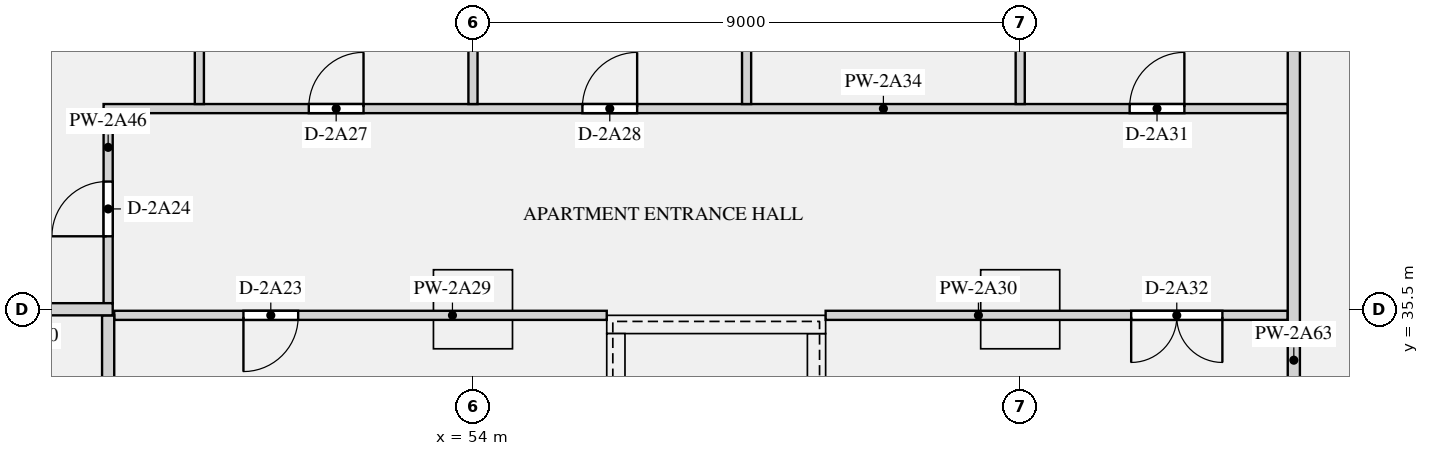
"""IFC4 building model, lengths in metres.
Left out: names, types, materials, properties, quantities, classifications, styles, units other than length and angle.
Written with IfcOpenShell. Run it as: python <this file> out.ifc"""

import sys

from ifc_helpers import new_model, si_unit, direction, frame, frame_2d, origin, origin_2d, place, context, subcontext, project, spatial, rectangle, extrude, element, fill, save


model = new_model("IFC4")
c1 = context("Model", 3, precision=1e-05, world=origin(), true_north=direction((0.0, 1.0)))
c2 = subcontext(c1, "Body", "Model", "MODEL_VIEW")
j1 = project(units=[si_unit("LENGTHUNIT", "METRE"), si_unit("PLANEANGLEUNIT", "RADIAN")], contexts=[c1])
p1 = place(None, origin())
s1 = spatial("IfcSite", under=j1, at=p1, CompositionType="ELEMENT")
p2 = place(p1, origin())
s2 = spatial("IfcBuilding", under=s1, at=p2, CompositionType="ELEMENT")
p3 = place(p2, frame((0.0, 0.0, 83.55)))
s3 = spatial("IfcBuildingStorey", under=s2, at=p3, CompositionType="ELEMENT", Elevation=83.55)
for number, where, z_axis, x_axis in (
    (1, (54.0, 35.5, 0.0), (0.0, 0.0, 1.0), (1.0, 0.0, 0.0)),
    (2, (63.0, 35.5, 0.0), (0.0, 0.0, 1.0), (1.0, 0.0, 0.0)),
):
    element("IfcColumn", number, at=place(p3, frame(where, z_axis=z_axis, x_axis=x_axis)), inside=s3, PredefinedType="COLUMN", context=c2, shape_type="SweptSolid", body=[
        extrude(rectangle(XDim=1.3, YDim=1.3, at=origin_2d()), origin(), (0.0, 0.0, 1.0), 3.15),
    ])
p4 = place(p3, frame((56.2, 35.25, 0.0), z_axis=(0.0, 0.0, 1.0), x_axis=(1.0, 0.0, 0.0)))
e3 = element("IfcWall", 3, at=p4, inside=s3, PredefinedType="SHEAR", context=c2, shape_type="SweptSolid", body=[
    extrude(rectangle(XDim=3.6, YDim=0.3, at=frame_2d((1.8, 0.0))), origin(), (0.0, 0.0, 1.0), 3.15),
])
for number, where, z_axis, x_axis in (
    (4, (56.35, 27.3, 0.0), (0.0, 0.0, 1.0), (0.0, 1.0, 0.0)),
    (5, (59.65, 27.3, 0.0), (0.0, 0.0, 1.0), (0.0, 1.0, 0.0)),
):
    element("IfcWall", number, at=place(p3, frame(where, z_axis=z_axis, x_axis=x_axis)), inside=s3, PredefinedType="SHEAR", context=c2, shape_type="SweptSolid", body=[
        extrude(rectangle(XDim=7.8, YDim=0.3, at=frame_2d((3.9, 0.0))), origin(), (0.0, 0.0, 1.0), 3.15),
    ])
p5 = place(p3, frame((45.0, 35.5, 0.0), z_axis=(0.0, 0.0, 1.0), x_axis=(1.0, 0.0, 0.0)))
e6 = element("IfcWall", 6, at=p5, inside=s3, PredefinedType="PARTITIONING", context=c2, shape_type="SweptSolid", body=[
    extrude(rectangle(XDim=3.075, YDim=0.2, at=frame_2d((1.538, 0.0))), origin(), (0.0, 0.0, 1.0), 2.83),
])
p6 = place(p3, frame((48.1, 35.4, 0.0), z_axis=(0.0, 0.0, 1.0), x_axis=(1.0, 0.0, 0.0)))
e7 = element("IfcWall", 7, at=p6, inside=s3, PredefinedType="PARTITIONING", context=c2, shape_type="SweptSolid", body=[
    extrude(rectangle(XDim=8.1, YDim=0.15, at=frame_2d((4.05, 0.0))), origin(), (0.0, 0.0, 1.0), 2.83),
])
p7 = place(p6, frame((2.125, 0.0, 0.0)))
e8 = element("IfcOpeningElement", 8, at=p7, cuts=e7, PredefinedType="OPENING", context=c2, shape_type="SweptSolid", body=[
    extrude(rectangle(XDim=0.9, YDim=2.1, at=frame_2d((0.45, 1.05))), frame((0.0, 0.085, 0.0), z_axis=(0.0, -1.0, 0.0), x_axis=(1.0, 0.0, 0.0)), (0.0, 0.0, 1.0), 0.17),
])
p8 = place(p3, frame((59.8, 35.4, 0.0), z_axis=(0.0, 0.0, 1.0), x_axis=(1.0, 0.0, 0.0)))
e9 = element("IfcWall", 9, at=p8, inside=s3, PredefinedType="PARTITIONING", context=c2, shape_type="SweptSolid", body=[
    extrude(rectangle(XDim=7.6, YDim=0.15, at=frame_2d((3.8, 0.0))), origin(), (0.0, 0.0, 1.0), 2.83),
])
p9 = place(p8, frame((5.025, 0.0, 0.0)))
e10 = element("IfcOpeningElement", 10, at=p9, cuts=e9, PredefinedType="OPENING", context=c2, shape_type="SweptSolid", body=[
    extrude(rectangle(XDim=1.5, YDim=2.1, at=frame_2d((0.75, 1.05))), frame((0.0, 0.085, 0.0), z_axis=(0.0, -1.0, 0.0), x_axis=(1.0, 0.0, 0.0)), (0.0, 0.0, 1.0), 0.17),
])
p10 = place(p3, frame((47.925, 38.8, 0.0), z_axis=(0.0, 0.0, 1.0), x_axis=(1.0, 0.0, 0.0)))
e11 = element("IfcWall", 11, at=p10, inside=s3, PredefinedType="PARTITIONING", context=c2, shape_type="SweptSolid", body=[
    extrude(rectangle(XDim=19.475, YDim=0.15, at=frame_2d((9.737, 0.0))), origin(), (0.0, 0.0, 1.0), 2.83),
])
p11 = place(p10, frame((3.375, 0.0, 0.0)))
e12 = element("IfcOpeningElement", 12, at=p11, cuts=e11, PredefinedType="OPENING", context=c2, shape_type="SweptSolid", body=[
    extrude(rectangle(XDim=0.9, YDim=2.1, at=frame_2d((0.45, 1.05))), frame((0.0, 0.085, 0.0), z_axis=(0.0, -1.0, 0.0), x_axis=(1.0, 0.0, 0.0)), (0.0, 0.0, 1.0), 0.17),
])
p12 = place(p10, frame((7.875, 0.0, 0.0)))
e13 = element("IfcOpeningElement", 13, at=p12, cuts=e11, PredefinedType="OPENING", context=c2, shape_type="SweptSolid", body=[
    extrude(rectangle(XDim=0.9, YDim=2.1, at=frame_2d((0.45, 1.05))), frame((0.0, 0.085, 0.0), z_axis=(0.0, -1.0, 0.0), x_axis=(1.0, 0.0, 0.0)), (0.0, 0.0, 1.0), 0.17),
])
p13 = place(p10, frame((16.875, 0.0, 0.0)))
e14 = element("IfcOpeningElement", 14, at=p13, cuts=e11, PredefinedType="OPENING", context=c2, shape_type="SweptSolid", body=[
    extrude(rectangle(XDim=0.9, YDim=2.1, at=frame_2d((0.45, 1.05))), frame((0.0, 0.085, 0.0), z_axis=(0.0, -1.0, 0.0), x_axis=(1.0, 0.0, 0.0)), (0.0, 0.0, 1.0), 0.17),
])
p14 = place(p3, frame((54.0, 38.875, 0.0), z_axis=(0.0, 0.0, 1.0), x_axis=(0.0, 1.0, 0.0)))
e15 = element("IfcWall", 15, at=p14, inside=s3, PredefinedType="PARTITIONING", context=c2, shape_type="SweptSolid", body=[
    extrude(rectangle(XDim=5.875, YDim=0.15, at=frame_2d((2.938, 0.0))), origin(), (0.0, 0.0, 1.0), 2.83),
])
p15 = place(p3, frame((48.0, 35.6, 0.0), z_axis=(0.0, 0.0, 1.0), x_axis=(0.0, 1.0, 0.0)))
e16 = element("IfcWall", 16, at=p15, inside=s3, PredefinedType="PARTITIONING", context=c2, shape_type="SweptSolid", body=[
    extrude(rectangle(XDim=3.125, YDim=0.15, at=frame_2d((1.562, 0.0))), origin(), (0.0, 0.0, 1.0), 2.83),
])
p16 = place(p15, frame((1.1, 0.0, 0.0)))
e17 = element("IfcOpeningElement", 17, at=p16, cuts=e16, PredefinedType="OPENING", context=c2, shape_type="SweptSolid", body=[
    extrude(rectangle(XDim=0.9, YDim=2.1, at=frame_2d((0.45, 1.05))), frame((0.0, 0.085, 0.0), z_axis=(0.0, -1.0, 0.0), x_axis=(1.0, 0.0, 0.0)), (0.0, 0.0, 1.0), 0.17),
])
p17 = place(p3, frame((48.0, 27.1, 0.0), z_axis=(0.0, 0.0, 1.0), x_axis=(0.0, 1.0, 0.0)))
e18 = element("IfcWall", 18, at=p17, inside=s3, PredefinedType="PARTITIONING", context=c2, shape_type="SweptSolid", body=[
    extrude(rectangle(XDim=8.3, YDim=0.2, at=frame_2d((4.15, 0.0))), origin(), (0.0, 0.0, 1.0), 2.83),
])
p18 = place(p17, frame((4.35, 0.0, 0.0)))
e19 = element("IfcOpeningElement", 19, at=p18, cuts=e18, PredefinedType="OPENING", context=c2, shape_type="SweptSolid", body=[
    extrude(rectangle(XDim=1.1, YDim=2.1, at=frame_2d((0.55, 1.05))), frame((0.0, 0.11, 0.0), z_axis=(0.0, -1.0, 0.0), x_axis=(1.0, 0.0, 0.0)), (0.0, 0.0, 1.0), 0.22),
])
p19 = place(p3, frame((49.5, 38.875, 0.0), z_axis=(0.0, 0.0, 1.0), x_axis=(0.0, 1.0, 0.0)))
e20 = element("IfcWall", 20, at=p19, inside=s3, PredefinedType="PARTITIONING", context=c2, shape_type="SweptSolid", body=[
    extrude(rectangle(XDim=5.875, YDim=0.15, at=frame_2d((2.938, 0.0))), origin(), (0.0, 0.0, 1.0), 2.83),
])
p20 = place(p3, frame((67.5, 24.575, 0.0), z_axis=(0.0, 0.0, 1.0), x_axis=(0.0, 1.0, 0.0)))
e21 = element("IfcWall", 21, at=p20, inside=s3, PredefinedType="PARTITIONING", context=c2, shape_type="SweptSolid", body=[
    extrude(rectangle(XDim=20.175, YDim=0.2, at=frame_2d((10.087, 0.0))), origin(), (0.0, 0.0, 1.0), 2.83),
])
p21 = place(p3, frame((58.5, 38.875, 0.0), z_axis=(0.0, 0.0, 1.0), x_axis=(0.0, 1.0, 0.0)))
e22 = element("IfcWall", 22, at=p21, inside=s3, PredefinedType="PARTITIONING", context=c2, shape_type="SweptSolid", body=[
    extrude(rectangle(XDim=5.875, YDim=0.15, at=frame_2d((2.938, 0.0))), origin(), (0.0, 0.0, 1.0), 2.83),
])
p22 = place(p21, frame((1.075, 0.0, 0.0)))
e23 = element("IfcOpeningElement", 23, at=p22, cuts=e22, PredefinedType="OPENING", context=c2, shape_type="SweptSolid", body=[
    extrude(rectangle(XDim=0.9, YDim=2.1, at=frame_2d((0.45, 1.05))), frame((0.0, 0.085, 0.0), z_axis=(0.0, -1.0, 0.0), x_axis=(1.0, 0.0, 0.0)), (0.0, 0.0, 1.0), 0.17),
])
p23 = place(p21, frame((4.125, 0.0, 0.0)))
e24 = element("IfcOpeningElement", 24, at=p23, cuts=e22, PredefinedType="OPENING", context=c2, shape_type="SweptSolid", body=[
    extrude(rectangle(XDim=0.9, YDim=2.1, at=frame_2d((0.45, 1.05))), frame((0.0, 0.085, 0.0), z_axis=(0.0, -1.0, 0.0), x_axis=(1.0, 0.0, 0.0)), (0.0, 0.0, 1.0), 0.17),
])
p24 = place(p3, frame((63.0, 38.875, 0.0), z_axis=(0.0, 0.0, 1.0), x_axis=(0.0, 1.0, 0.0)))
e25 = element("IfcWall", 25, at=p24, inside=s3, PredefinedType="PARTITIONING", context=c2, shape_type="SweptSolid", body=[
    extrude(rectangle(XDim=5.875, YDim=0.15, at=frame_2d((2.938, 0.0))), origin(), (0.0, 0.0, 1.0), 2.83),
])
p25 = place(p7, frame((0.9, 0.0, 0.0), z_axis=(0.0, 0.0, 1.0), x_axis=(-1.0, 0.0, 0.0)))
e26 = element("IfcDoor", 26, at=p25, inside=s3, OperationType="SINGLE_SWING_RIGHT", PredefinedType="DOOR", context=c2, shape_type="SweptSolid", body=[
    extrude(rectangle(XDim=0.9, YDim=2.1, at=frame_2d((0.45, 1.05))), frame((0.0, 0.025, 0.0), z_axis=(0.0, -1.0, 0.0), x_axis=(1.0, 0.0, 0.0)), (0.0, 0.0, 1.0), 0.05),
])
fill(e8, e26)
p26 = place(p16, origin())
e27 = element("IfcDoor", 27, at=p26, inside=s3, OperationType="SINGLE_SWING_LEFT", PredefinedType="DOOR", context=c2, shape_type="SweptSolid", body=[
    extrude(rectangle(XDim=0.9, YDim=2.1, at=frame_2d((0.45, 1.05))), frame((0.0, 0.025, 0.0), z_axis=(0.0, -1.0, 0.0), x_axis=(1.0, 0.0, 0.0)), (0.0, 0.0, 1.0), 0.05),
])
fill(e17, e27)
p27 = place(p11, origin())
e28 = element("IfcDoor", 28, at=p27, inside=s3, OperationType="SINGLE_SWING_RIGHT", PredefinedType="DOOR", context=c2, shape_type="SweptSolid", body=[
    extrude(rectangle(XDim=0.9, YDim=2.1, at=frame_2d((0.45, 1.05))), frame((0.0, 0.025, 0.0), z_axis=(0.0, -1.0, 0.0), x_axis=(1.0, 0.0, 0.0)), (0.0, 0.0, 1.0), 0.05),
])
fill(e12, e28)
p28 = place(p12, origin())
e29 = element("IfcDoor", 29, at=p28, inside=s3, OperationType="SINGLE_SWING_RIGHT", PredefinedType="DOOR", context=c2, shape_type="SweptSolid", body=[
    extrude(rectangle(XDim=0.9, YDim=2.1, at=frame_2d((0.45, 1.05))), frame((0.0, 0.025, 0.0), z_axis=(0.0, -1.0, 0.0), x_axis=(1.0, 0.0, 0.0)), (0.0, 0.0, 1.0), 0.05),
])
fill(e13, e29)
p29 = place(p13, origin())
e30 = element("IfcDoor", 30, at=p29, inside=s3, OperationType="SINGLE_SWING_RIGHT", PredefinedType="DOOR", context=c2, shape_type="SweptSolid", body=[
    extrude(rectangle(XDim=0.9, YDim=2.1, at=frame_2d((0.45, 1.05))), frame((0.0, 0.025, 0.0), z_axis=(0.0, -1.0, 0.0), x_axis=(1.0, 0.0, 0.0)), (0.0, 0.0, 1.0), 0.05),
])
fill(e14, e30)
p30 = place(p9, frame((1.5, 0.0, 0.0), z_axis=(0.0, 0.0, 1.0), x_axis=(-1.0, 0.0, 0.0)))
e31 = element("IfcDoor", 31, at=p30, inside=s3, OperationType="DOUBLE_DOOR_SINGLE_SWING", PredefinedType="DOOR", context=c2, shape_type="SweptSolid", body=[
    extrude(rectangle(XDim=1.5, YDim=2.1, at=frame_2d((0.75, 1.05))), frame((0.0, 0.025, 0.0), z_axis=(0.0, -1.0, 0.0), x_axis=(1.0, 0.0, 0.0)), (0.0, 0.0, 1.0), 0.05),
])
fill(e10, e31)
save(model, sys.argv[1])
